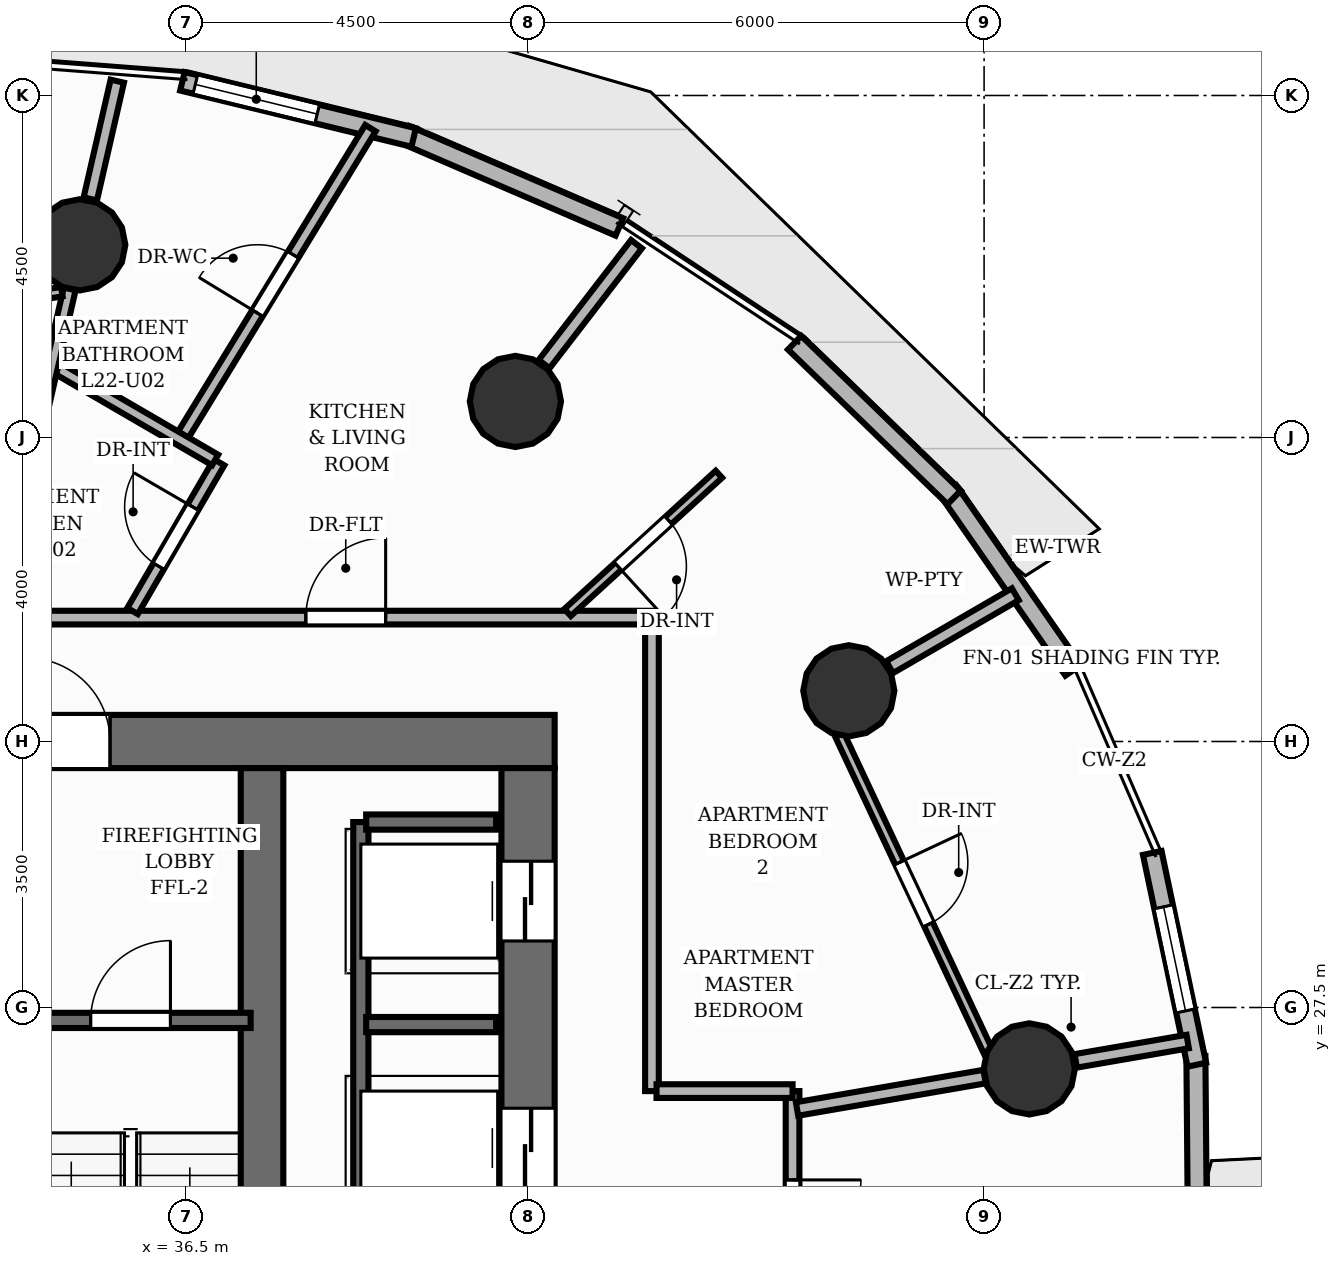
"""IFC4 building model, lengths in metres.
Left out: names, types, materials, properties, quantities, classifications, styles, units other than length and angle.
Written with IfcOpenShell. Run it as: python <this file> out.ifc"""

import sys

from ifc_helpers import new_model, si_unit, direction, frame, frame_2d, origin, origin_2d, place, context, subcontext, project, spatial, rectangle, circle, extrude, element, fill, save


model = new_model("IFC4")
c1 = context("Model", 3, precision=1e-05, world=origin(), true_north=direction((0.0, 1.0)))
c2 = subcontext(c1, "Body", "Model", "MODEL_VIEW")
j1 = project(units=[si_unit("LENGTHUNIT", "METRE"), si_unit("PLANEANGLEUNIT", "RADIAN")], contexts=[c1])
p1 = place(None, origin())
s1 = spatial("IfcSite", under=j1, at=p1, CompositionType="ELEMENT")
p2 = place(p1, origin())
s2 = spatial("IfcBuilding", under=s1, at=p2, CompositionType="ELEMENT")
p3 = place(p2, frame((0.0, 0.0, 77.28)))
s3 = spatial("IfcBuildingStorey", under=s2, at=p3, CompositionType="ELEMENT", Elevation=77.28)
p4 = place(p3, frame((22.65, 31.0, 0.0), z_axis=(0.0, 0.0, 1.0), x_axis=(1.0, 0.0, 0.0)))
e1 = element("IfcWall", 1, at=p4, inside=s3, PredefinedType="SHEAR", context=c2, shape_type="SweptSolid", body=[
    extrude(rectangle(XDim=18.7, YDim=0.7, at=frame_2d((9.35, 0.0))), origin(), (0.0, 0.0, 1.0), 3.2),
])
p5 = place(p4, frame((11.75, 0.0, 0.0)))
e2 = element("IfcOpeningElement", 2, at=p5, cuts=e1, PredefinedType="OPENING", context=c2, shape_type="SweptSolid", body=[
    extrude(rectangle(XDim=1.1, YDim=2.15, at=frame_2d((0.55, 1.075))), frame((0.0, 0.36, 0.0), z_axis=(0.0, -1.0, 0.0), x_axis=(1.0, 0.0, 0.0)), (0.0, 0.0, 1.0), 0.72),
])
p6 = place(p3, frame((41.0, 17.35, 0.0), z_axis=(0.0, 0.0, 1.0), x_axis=(0.0, 1.0, 0.0)))
e3 = element("IfcWall", 3, at=p6, inside=s3, PredefinedType="SHEAR", context=c2, shape_type="SweptSolid", body=[
    extrude(rectangle(XDim=13.3, YDim=0.7, at=frame_2d((6.65, 0.0))), origin(), (0.0, 0.0, 1.0), 3.2),
])
p7 = place(p6, frame((1.225, 0.0, 0.0)))
e4 = element("IfcOpeningElement", 4, at=p7, cuts=e3, PredefinedType="OPENING", context=c2, shape_type="SweptSolid", body=[
    extrude(rectangle(XDim=1.05, YDim=2.15, at=frame_2d((0.525, 1.075))), frame((0.0, 0.36, 0.0), z_axis=(0.0, -1.0, 0.0), x_axis=(1.0, 0.0, 0.0)), (0.0, 0.0, 1.0), 0.72),
])
p8 = place(p6, frame((4.475, 0.0, 0.0)))
e5 = element("IfcOpeningElement", 5, at=p8, cuts=e3, PredefinedType="OPENING", context=c2, shape_type="SweptSolid", body=[
    extrude(rectangle(XDim=1.05, YDim=2.15, at=frame_2d((0.525, 1.075))), frame((0.0, 0.36, 0.0), z_axis=(0.0, -1.0, 0.0), x_axis=(1.0, 0.0, 0.0)), (0.0, 0.0, 1.0), 0.72),
])
p9 = place(p6, frame((7.775, 0.0, 0.0)))
e6 = element("IfcOpeningElement", 6, at=p9, cuts=e3, PredefinedType="OPENING", context=c2, shape_type="SweptSolid", body=[
    extrude(rectangle(XDim=1.05, YDim=2.15, at=frame_2d((0.525, 1.075))), frame((0.0, 0.36, 0.0), z_axis=(0.0, -1.0, 0.0), x_axis=(1.0, 0.0, 0.0)), (0.0, 0.0, 1.0), 0.72),
])
p10 = place(p6, frame((11.025, 0.0, 0.0)))
e7 = element("IfcOpeningElement", 7, at=p10, cuts=e3, PredefinedType="OPENING", context=c2, shape_type="SweptSolid", body=[
    extrude(rectangle(XDim=1.05, YDim=2.15, at=frame_2d((0.525, 1.075))), frame((0.0, 0.36, 0.0), z_axis=(0.0, -1.0, 0.0), x_axis=(1.0, 0.0, 0.0)), (0.0, 0.0, 1.0), 0.72),
])
p11 = place(p3, frame((37.5, 17.35, 0.0), z_axis=(0.0, 0.0, 1.0), x_axis=(0.0, 1.0, 0.0)))
e8 = element("IfcWall", 8, at=p11, inside=s3, PredefinedType="SHEAR", context=c2, shape_type="SweptSolid", body=[
    extrude(rectangle(XDim=13.3, YDim=0.56, at=frame_2d((6.65, 0.0))), origin(), (0.0, 0.0, 1.0), 3.2),
])
for number, where, z_axis, x_axis in (
    (9, (47.594, 26.692, 0.0), (0.0, 0.0, 1.0), (1.0, 0.0, 0.0)),
    (10, (45.22, 31.667, 0.0), (0.0, 0.0, 1.0), (1.0, 0.0, 0.0)),
    (11, (40.833, 35.474, 0.0), (0.0, 0.0, 1.0), (1.0, 0.0, 0.0)),
    (12, (35.102, 37.535, 0.0), (0.0, 0.0, 1.0), (1.0, 0.0, 0.0)),
):
    element("IfcColumn", number, at=place(p3, frame(where, z_axis=z_axis, x_axis=x_axis)), inside=s3, PredefinedType="COLUMN", context=c2, shape_type="SweptSolid", body=[
        extrude(circle(Radius=0.6, at=origin_2d()), origin(), (0.0, 0.0, 1.0), 3.2),
    ])
p12 = place(p3, frame((46.532, 34.298, 0.0), z_axis=(0.0, 0.0, 1.0), x_axis=(0.570574087236, -0.821246133005, 0.0)))
e13 = element("IfcWall", 13, at=p12, inside=s3, PredefinedType="SOLIDWALL", context=c2, shape_type="SweptSolid", body=[
    extrude(rectangle(XDim=2.874, YDim=0.25, at=frame_2d((1.437, 0.0))), origin(), (0.0, 0.0, 1.0), 2.96),
])
p13 = place(p3, frame((44.507, 36.247, 0.0), z_axis=(0.0, 0.0, 1.0), x_axis=(0.717880157086, -0.696166704219, 0.0)))
e14 = element("IfcWall", 14, at=p13, inside=s3, PredefinedType="SOLIDWALL", context=c2, shape_type="SweptSolid", body=[
    extrude(rectangle(XDim=2.923, YDim=0.25, at=frame_2d((1.462, 0.0))), origin(), (0.0, 0.0, 1.0), 2.96),
])
p14 = place(p3, frame((39.39, 38.982, 0.0), z_axis=(0.0, 0.0, 1.0), x_axis=(0.91829708806, -0.395891977766, 0.0)))
e15 = element("IfcWall", 15, at=p14, inside=s3, PredefinedType="SOLIDWALL", context=c2, shape_type="SweptSolid", body=[
    extrude(rectangle(XDim=3.061, YDim=0.25, at=frame_2d((1.53, 0.0))), origin(), (0.0, 0.0, 1.0), 2.96),
])
p15 = place(p3, frame((36.452, 39.687, 0.0), z_axis=(0.0, 0.0, 1.0), x_axis=(0.971748850292, -0.236017312833, 0.0)))
e16 = element("IfcWall", 16, at=p15, inside=s3, PredefinedType="SOLIDWALL", context=c2, shape_type="SweptSolid", body=[
    extrude(rectangle(XDim=3.131, YDim=0.25, at=frame_2d((1.565, 0.0))), origin(), (0.0, 0.0, 1.0), 2.96),
])
p16 = place(p15, frame((0.175, 0.0, 0.85)))
e17 = element("IfcOpeningElement", 17, at=p16, cuts=e16, PredefinedType="OPENING", context=c2, shape_type="SweptSolid", body=[
    extrude(rectangle(XDim=1.65, YDim=1.55, at=frame_2d((0.825, 0.775))), frame((0.0, 0.135, 0.0), z_axis=(0.0, -1.0, 0.0), x_axis=(1.0, 0.0, 0.0)), (0.0, 0.0, 1.0), 0.27),
])
p17 = place(p3, frame((49.787, 26.861, 0.0), z_axis=(0.0, 0.0, 1.0), x_axis=(0.008580093639, -0.999963190319, 0.0)))
e18 = element("IfcWall", 18, at=p17, inside=s3, PredefinedType="SOLIDWALL", context=c2, shape_type="SweptSolid", body=[
    extrude(rectangle(XDim=2.874, YDim=0.25, at=frame_2d((1.437, 0.0))), origin(), (0.0, 0.0, 1.0), 2.96),
])
p18 = place(p3, frame((49.213, 29.533, 0.0), z_axis=(0.0, 0.0, 1.0), x_axis=(0.205949984324, -0.978562519187, 0.0)))
e19 = element("IfcWall", 19, at=p18, inside=s3, PredefinedType="SOLIDWALL", context=c2, shape_type="SweptSolid", body=[
    extrude(rectangle(XDim=2.847, YDim=0.25, at=frame_2d((1.424, 0.0))), origin(), (0.0, 0.0, 1.0), 2.96),
])
p19 = place(p18, frame((0.724, 0.0, 0.85)))
e20 = element("IfcOpeningElement", 20, at=p19, cuts=e19, PredefinedType="OPENING", context=c2, shape_type="SweptSolid", body=[
    extrude(rectangle(XDim=1.4, YDim=1.55, at=frame_2d((0.7, 0.775))), frame((0.0, 0.135, 0.0), z_axis=(0.0, -1.0, 0.0), x_axis=(1.0, 0.0, 0.0)), (0.0, 0.0, 1.0), 0.27),
])
p20 = place(p3, frame((34.11, 27.33, 0.0), z_axis=(0.0, 0.0, 1.0), x_axis=(1.0, 0.0, 0.0)))
e21 = element("IfcWall", 21, at=p20, inside=s3, PredefinedType="SHEAR", context=c2, shape_type="SweptSolid", body=[
    extrude(rectangle(XDim=3.24, YDim=0.2, at=frame_2d((1.62, 0.0))), origin(), (0.0, 0.0, 1.0), 3.2),
])
p21 = place(p20, frame((1.135, 0.0, 0.0)))
e22 = element("IfcOpeningElement", 22, at=p21, cuts=e21, PredefinedType="OPENING", context=c2, shape_type="SweptSolid", body=[
    extrude(rectangle(XDim=1.05, YDim=2.15, at=frame_2d((0.525, 1.075))), frame((0.0, 0.11, 0.0), z_axis=(0.0, -1.0, 0.0), x_axis=(1.0, 0.0, 0.0)), (0.0, 0.0, 1.0), 0.22),
])
p22 = place(p3, frame((38.8, 18.06, 0.0), z_axis=(0.0, 0.0, 1.0), x_axis=(0.0, 1.0, 0.0)))
e23 = element("IfcWall", 23, at=p22, inside=s3, PredefinedType="SHEAR", context=c2, shape_type="SweptSolid", body=[
    extrude(rectangle(XDim=11.88, YDim=0.2, at=frame_2d((5.94, 0.0))), origin(), (0.0, 0.0, 1.0), 3.2),
])
for number, where, z_axis, x_axis in (
    (24, (38.87, 29.94, 0.0), (0.0, 0.0, 1.0), (1.0, 0.0, 0.0)),
    (25, (38.87, 27.275, 0.0), (0.0, 0.0, 1.0), (1.0, 0.0, 0.0)),
):
    element("IfcWall", number, at=place(p3, frame(where, z_axis=z_axis, x_axis=x_axis)), inside=s3, PredefinedType="SHEAR", context=c2, shape_type="SweptSolid", body=[
        extrude(rectangle(XDim=1.71, YDim=0.2, at=frame_2d((0.855, 0.0))), origin(), (0.0, 0.0, 1.0), 3.2),
    ])
p23 = place(p3, frame((48.206, 26.798, 0.0), z_axis=(0.0, 0.0, 1.0), x_axis=(0.985414821555, 0.170169413997, 0.0)))
e26 = element("IfcWall", 26, at=p23, inside=s3, PredefinedType="PARTITIONING", context=c2, shape_type="SweptSolid", body=[
    extrude(rectangle(XDim=1.495, YDim=0.18, at=frame_2d((0.748, 0.0))), origin(), (0.0, 0.0, 1.0), 2.26),
])
p24 = place(p3, frame((45.757, 31.978, 0.0), z_axis=(0.0, 0.0, 1.0), x_axis=(0.86503562166, 0.501710447628, 0.0)))
e27 = element("IfcWall", 27, at=p24, inside=s3, PredefinedType="PARTITIONING", context=c2, shape_type="SweptSolid", body=[
    extrude(rectangle(XDim=1.912, YDim=0.18, at=frame_2d((0.956, 0.0))), origin(), (0.0, 0.0, 1.0), 2.26),
])
p25 = place(p3, frame((41.212, 35.966, 0.0), z_axis=(0.0, 0.0, 1.0), x_axis=(0.609995088008, 0.792405194712, 0.0)))
e28 = element("IfcWall", 28, at=p25, inside=s3, PredefinedType="PARTITIONING", context=c2, shape_type="SweptSolid", body=[
    extrude(rectangle(XDim=1.991, YDim=0.18, at=frame_2d((0.996, 0.0))), origin(), (0.0, 0.0, 1.0), 2.26),
])
p26 = place(p3, frame((35.24, 38.139, 0.0), z_axis=(0.0, 0.0, 1.0), x_axis=(0.223333591652, 0.974742071955, 0.0)))
e29 = element("IfcWall", 29, at=p26, inside=s3, PredefinedType="PARTITIONING", context=c2, shape_type="SweptSolid", body=[
    extrude(rectangle(XDim=1.589, YDim=0.18, at=frame_2d((0.795, 0.0))), origin(), (0.0, 0.0, 1.0), 2.26),
])
p27 = place(p3, frame((44.48, 26.4, 0.0), z_axis=(0.0, 0.0, 1.0), x_axis=(0.0, -1.0, 0.0)))
e30 = element("IfcWall", 30, at=p27, inside=s3, PredefinedType="PARTITIONING", context=c2, shape_type="SweptSolid", body=[
    extrude(rectangle(XDim=4.8, YDim=0.18, at=frame_2d((2.4, 0.0))), origin(), (0.0, 0.0, 1.0), 2.955),
])
p28 = place(p27, frame((1.169, 0.0, 0.0)))
e31 = element("IfcOpeningElement", 31, at=p28, cuts=e30, PredefinedType="OPENING", context=c2, shape_type="SweptSolid", body=[
    extrude(rectangle(XDim=0.9, YDim=2.1, at=frame_2d((0.45, 1.05))), frame((0.0, 0.1, 0.0), z_axis=(0.0, -1.0, 0.0), x_axis=(1.0, 0.0, 0.0)), (0.0, 0.0, 1.0), 0.2),
])
p29 = place(p3, frame((26.431, 32.63, 0.0), z_axis=(0.0, 0.0, 1.0), x_axis=(1.0, 0.0, 0.0)))
e32 = element("IfcWall", 32, at=p29, inside=s3, PredefinedType="PARTITIONING", context=c2, shape_type="SweptSolid", body=[
    extrude(rectangle(XDim=16.199, YDim=0.18, at=frame_2d((8.099, 0.0))), origin(), (0.0, 0.0, 1.0), 2.955),
])
p30 = place(p29, frame((11.645, 0.0, 0.0)))
e33 = element("IfcOpeningElement", 33, at=p30, cuts=e32, PredefinedType="OPENING", context=c2, shape_type="SweptSolid", body=[
    extrude(rectangle(XDim=1.05, YDim=2.15, at=frame_2d((0.525, 1.075))), frame((0.0, 0.1, 0.0), z_axis=(0.0, -1.0, 0.0), x_axis=(1.0, 0.0, 0.0)), (0.0, 0.0, 1.0), 0.2),
])
p31 = place(p3, frame((42.63, 32.63, 0.0), z_axis=(0.0, 0.0, 1.0), x_axis=(0.0, -1.0, 0.0)))
e34 = element("IfcWall", 34, at=p31, inside=s3, PredefinedType="PARTITIONING", context=c2, shape_type="SweptSolid", body=[
    extrude(rectangle(XDim=6.23, YDim=0.18, at=frame_2d((3.115, 0.0))), origin(), (0.0, 0.0, 1.0), 2.955),
])
p32 = place(p3, frame((42.69, 26.4, 0.0), z_axis=(0.0, 0.0, 1.0), x_axis=(1.0, 0.0, 0.0)))
e35 = element("IfcWall", 35, at=p32, inside=s3, PredefinedType="PARTITIONING", context=c2, shape_type="SweptSolid", body=[
    extrude(rectangle(XDim=1.79, YDim=0.18, at=frame_2d((0.895, 0.0))), origin(), (0.0, 0.0, 1.0), 2.26),
])
p33 = place(p3, frame((44.539, 26.165, 0.0), z_axis=(0.0, 0.0, 1.0), x_axis=(0.985420684403, 0.170135460006, 0.0)))
e36 = element("IfcWall", 36, at=p33, inside=s3, PredefinedType="PARTITIONING", context=c2, shape_type="SweptSolid", body=[
    extrude(rectangle(XDim=2.504, YDim=0.18, at=frame_2d((1.252, 0.0))), origin(), (0.0, 0.0, 1.0), 2.26),
])
p34 = place(p3, frame((36.424, 34.971, 0.0), z_axis=(0.0, 0.0, 1.0), x_axis=(0.521036660125, 0.853534298553, 0.0)))
e37 = element("IfcWall", 37, at=p34, inside=s3, PredefinedType="PLUMBINGWALL", context=c2, shape_type="SweptSolid", body=[
    extrude(rectangle(XDim=4.803, YDim=0.16, at=frame_2d((2.401, 0.0))), origin(), (0.0, 0.0, 1.0), 2.641),
])
p35 = place(p34, frame((1.951, 0.0, 0.0)))
e38 = element("IfcOpeningElement", 38, at=p35, cuts=e37, PredefinedType="OPENING", context=c2, shape_type="SweptSolid", body=[
    extrude(rectangle(XDim=0.9, YDim=2.1, at=frame_2d((0.45, 1.05))), frame((0.0, 0.09, 0.0), z_axis=(0.0, -1.0, 0.0), x_axis=(1.0, 0.0, 0.0)), (0.0, 0.0, 1.0), 0.18),
])
p36 = place(p3, frame((43.511, 34.516, 0.0), z_axis=(0.0, 0.0, 1.0), x_axis=(-0.738303163636, -0.674469004896, 0.0)))
e39 = element("IfcWall", 39, at=p36, inside=s3, PredefinedType="PARTITIONING", context=c2, shape_type="SweptSolid", body=[
    extrude(rectangle(XDim=2.696, YDim=0.125, at=frame_2d((1.348, 0.0))), origin(), (0.0, 0.0, 1.0), 2.955),
])
p37 = place(p36, frame((0.898, 0.0, 0.0)))
e40 = element("IfcOpeningElement", 40, at=p37, cuts=e39, PredefinedType="OPENING", context=c2, shape_type="SweptSolid", body=[
    extrude(rectangle(XDim=0.9, YDim=2.1, at=frame_2d((0.45, 1.05))), frame((0.0, 0.073, 0.0), z_axis=(0.0, -1.0, 0.0), x_axis=(1.0, 0.0, 0.0)), (0.0, 0.0, 1.0), 0.145),
])
p38 = place(p3, frame((35.797, 32.716, 0.0), z_axis=(0.0, 0.0, 1.0), x_axis=(0.50256985659, 0.864536603763, 0.0)))
e41 = element("IfcWall", 41, at=p38, inside=s3, PredefinedType="PLUMBINGWALL", context=c2, shape_type="SweptSolid", body=[
    extrude(rectangle(XDim=2.264, YDim=0.16, at=frame_2d((1.132, 0.0))), origin(), (0.0, 0.0, 1.0), 2.955),
])
p39 = place(p38, frame((0.682, 0.0, 0.0)))
e42 = element("IfcOpeningElement", 42, at=p39, cuts=e41, PredefinedType="OPENING", context=c2, shape_type="SweptSolid", body=[
    extrude(rectangle(XDim=0.9, YDim=2.1, at=frame_2d((0.45, 1.05))), frame((0.0, 0.09, 0.0), z_axis=(0.0, -1.0, 0.0), x_axis=(1.0, 0.0, 0.0)), (0.0, 0.0, 1.0), 0.18),
])
p40 = place(p3, frame((36.883, 34.704, 0.0), z_axis=(0.0, 0.0, 1.0), x_axis=(-0.864542002386, 0.502560569594, 0.0)))
e43 = element("IfcWall", 43, at=p40, inside=s3, PredefinedType="PLUMBINGWALL", context=c2, shape_type="SweptSolid", body=[
    extrude(rectangle(XDim=2.48, YDim=0.16, at=frame_2d((1.24, 0.0))), origin(), (0.0, 0.0, 1.0), 2.955),
])
p41 = place(p3, frame((33.978, 32.63, 0.0), z_axis=(0.0, 0.0, 1.0), x_axis=(0.223368533365, 0.974734065426, 0.0)))
e44 = element("IfcWall", 44, at=p41, inside=s3, PredefinedType="PLUMBINGWALL", context=c2, shape_type="SweptSolid", body=[
    extrude(rectangle(XDim=4.438, YDim=0.16, at=frame_2d((2.219, 0.0))), origin(), (0.0, 0.0, 1.0), 2.26),
])
p42 = place(p3, frame((45.098, 31.087, 0.0), z_axis=(0.0, 0.0, 1.0), x_axis=(0.424725570062, -0.905322147158, 0.0)))
e45 = element("IfcWall", 45, at=p42, inside=s3, PredefinedType="PARTITIONING", context=c2, shape_type="SweptSolid", body=[
    extrude(rectangle(XDim=4.61, YDim=0.125, at=frame_2d((2.305, 0.0))), origin(), (0.0, 0.0, 1.0), 2.955),
])
p43 = place(p42, frame((1.855, 0.0, 0.0)))
e46 = element("IfcOpeningElement", 46, at=p43, cuts=e45, PredefinedType="OPENING", context=c2, shape_type="SweptSolid", body=[
    extrude(rectangle(XDim=0.9, YDim=2.1, at=frame_2d((0.45, 1.05))), frame((0.0, 0.073, 0.0), z_axis=(0.0, -1.0, 0.0), x_axis=(1.0, 0.0, 0.0)), (0.0, 0.0, 1.0), 0.145),
])
p44 = place(p3, frame((24.875, 35.259, 0.0), z_axis=(0.0, 0.0, 1.0), x_axis=(0.986466792703, 0.163961174958, 0.0)))
e47 = element("IfcWall", 47, at=p44, inside=s3, PredefinedType="PARTITIONING", context=c2, shape_type="SweptSolid", body=[
    extrude(rectangle(XDim=10.128, YDim=0.125, at=frame_2d((5.064, 0.0))), origin(), (0.0, 0.0, 1.0), 2.955),
])
p45 = place(p44, frame((5.034, 0.0, 0.0)))
e48 = element("IfcOpeningElement", 48, at=p45, cuts=e47, PredefinedType="OPENING", context=c2, shape_type="SweptSolid", body=[
    extrude(rectangle(XDim=0.9, YDim=2.1, at=frame_2d((0.45, 1.05))), frame((0.0, 0.073, 0.0), z_axis=(0.0, -1.0, 0.0), x_axis=(1.0, 0.0, 0.0)), (0.0, 0.0, 1.0), 0.145),
])
p46 = place(p16, origin())
e49 = element("IfcWindow", 49, at=p46, inside=s3, PartitioningType="SINGLE_PANEL", PredefinedType="WINDOW", context=c2, shape_type="SweptSolid", body=[
    extrude(rectangle(XDim=1.65, YDim=1.55, at=frame_2d((0.825, 0.775))), frame((0.0, 0.03, 0.0), z_axis=(0.0, -1.0, 0.0), x_axis=(1.0, 0.0, 0.0)), (0.0, 0.0, 1.0), 0.06),
])
fill(e17, e49)
p47 = place(p19, origin())
e50 = element("IfcWindow", 50, at=p47, inside=s3, PartitioningType="SINGLE_PANEL", PredefinedType="WINDOW", context=c2, shape_type="SweptSolid", body=[
    extrude(rectangle(XDim=1.4, YDim=1.55, at=frame_2d((0.7, 0.775))), frame((0.0, 0.03, 0.0), z_axis=(0.0, -1.0, 0.0), x_axis=(1.0, 0.0, 0.0)), (0.0, 0.0, 1.0), 0.06),
])
fill(e20, e50)
p48 = place(p21, origin())
e51 = element("IfcDoor", 51, at=p48, inside=s3, OperationType="SINGLE_SWING_RIGHT", PredefinedType="DOOR", context=c2, shape_type="SweptSolid", body=[
    extrude(rectangle(XDim=1.05, YDim=2.15, at=frame_2d((0.525, 1.075))), frame((0.0, 0.025, 0.0), z_axis=(0.0, -1.0, 0.0), x_axis=(1.0, 0.0, 0.0)), (0.0, 0.0, 1.0), 0.05),
])
fill(e22, e51)
p49 = place(p5, origin())
e52 = element("IfcDoor", 52, at=p49, inside=s3, OperationType="SINGLE_SWING_LEFT", PredefinedType="DOOR", context=c2, shape_type="SweptSolid", body=[
    extrude(rectangle(XDim=1.1, YDim=2.15, at=frame_2d((0.55, 1.075))), frame((0.0, 0.025, 0.0), z_axis=(0.0, -1.0, 0.0), x_axis=(1.0, 0.0, 0.0)), (0.0, 0.0, 1.0), 0.05),
])
fill(e2, e52)
p50 = place(p9, origin())
e53 = element("IfcDoor", 53, at=p50, inside=s3, OperationType="DOUBLE_DOOR_SLIDING", PredefinedType="DOOR", context=c2, shape_type="SweptSolid", body=[
    extrude(rectangle(XDim=1.05, YDim=2.15, at=frame_2d((0.525, 1.075))), frame((0.0, 0.025, 0.0), z_axis=(0.0, -1.0, 0.0), x_axis=(1.0, 0.0, 0.0)), (0.0, 0.0, 1.0), 0.05),
])
fill(e6, e53)
p51 = place(p10, origin())
e54 = element("IfcDoor", 54, at=p51, inside=s3, OperationType="DOUBLE_DOOR_SLIDING", PredefinedType="DOOR", context=c2, shape_type="SweptSolid", body=[
    extrude(rectangle(XDim=1.05, YDim=2.15, at=frame_2d((0.525, 1.075))), frame((0.0, 0.025, 0.0), z_axis=(0.0, -1.0, 0.0), x_axis=(1.0, 0.0, 0.0)), (0.0, 0.0, 1.0), 0.05),
])
fill(e7, e54)
p52 = place(p28, origin())
e55 = element("IfcDoor", 55, at=p52, inside=s3, OperationType="SINGLE_SWING_LEFT", PredefinedType="DOOR", context=c2, shape_type="SweptSolid", body=[
    extrude(rectangle(XDim=0.9, YDim=2.1, at=frame_2d((0.45, 1.05))), frame((0.0, 0.025, 0.0), z_axis=(0.0, -1.0, 0.0), x_axis=(1.0, 0.0, 0.0)), (0.0, 0.0, 1.0), 0.05),
])
fill(e31, e55)
p53 = place(p30, origin())
e56 = element("IfcDoor", 56, at=p53, inside=s3, OperationType="SINGLE_SWING_RIGHT", PredefinedType="DOOR", context=c2, shape_type="SweptSolid", body=[
    extrude(rectangle(XDim=1.05, YDim=2.15, at=frame_2d((0.525, 1.075))), frame((0.0, 0.025, 0.0), z_axis=(0.0, -1.0, 0.0), x_axis=(1.0, 0.0, 0.0)), (0.0, 0.0, 1.0), 0.05),
])
fill(e33, e56)
p54 = place(p35, origin())
e57 = element("IfcDoor", 57, at=p54, inside=s3, OperationType="SINGLE_SWING_LEFT", PredefinedType="DOOR", context=c2, shape_type="SweptSolid", body=[
    extrude(rectangle(XDim=0.9, YDim=2.1, at=frame_2d((0.45, 1.05))), frame((0.0, 0.025, 0.0), z_axis=(0.0, -1.0, 0.0), x_axis=(1.0, 0.0, 0.0)), (0.0, 0.0, 1.0), 0.05),
])
fill(e38, e57)
p55 = place(p37, origin())
e58 = element("IfcDoor", 58, at=p55, inside=s3, OperationType="SINGLE_SWING_RIGHT", PredefinedType="DOOR", context=c2, shape_type="SweptSolid", body=[
    extrude(rectangle(XDim=0.9, YDim=2.1, at=frame_2d((0.45, 1.05))), frame((0.0, 0.025, 0.0), z_axis=(0.0, -1.0, 0.0), x_axis=(1.0, 0.0, 0.0)), (0.0, 0.0, 1.0), 0.05),
])
fill(e40, e58)
p56 = place(p43, origin())
e59 = element("IfcDoor", 59, at=p56, inside=s3, OperationType="SINGLE_SWING_LEFT", PredefinedType="DOOR", context=c2, shape_type="SweptSolid", body=[
    extrude(rectangle(XDim=0.9, YDim=2.1, at=frame_2d((0.45, 1.05))), frame((0.0, 0.025, 0.0), z_axis=(0.0, -1.0, 0.0), x_axis=(1.0, 0.0, 0.0)), (0.0, 0.0, 1.0), 0.05),
])
fill(e46, e59)
p57 = place(p39, origin())
e60 = element("IfcDoor", 60, at=p57, inside=s3, OperationType="SINGLE_SWING_RIGHT", PredefinedType="DOOR", context=c2, shape_type="SweptSolid", body=[
    extrude(rectangle(XDim=0.9, YDim=2.1, at=frame_2d((0.45, 1.05))), frame((0.0, 0.025, 0.0), z_axis=(0.0, -1.0, 0.0), x_axis=(1.0, 0.0, 0.0)), (0.0, 0.0, 1.0), 0.05),
])
fill(e42, e60)
save(model, sys.argv[1])
